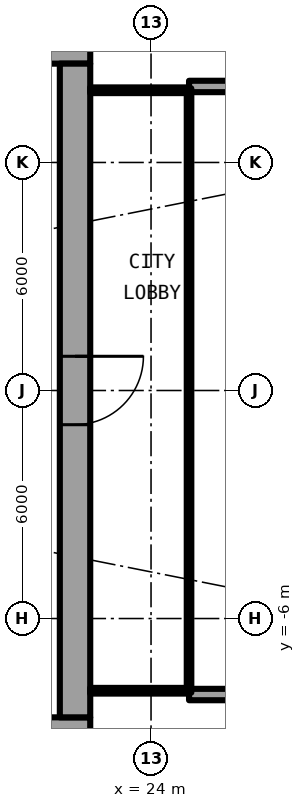
"""IFC4 building model, lengths in metres.
Left out: names, types, materials, properties, quantities, classifications, styles, units other than length and angle.
Written with IfcOpenShell. Run it as: python <this file> out.ifc"""

import sys

from ifc_helpers import new_model, si_unit, direction, frame, frame_2d, origin, place, context, subcontext, project, spatial, rectangle, extrude, element, fill, save


model = new_model("IFC4")
c1 = context("Model", 3, precision=1e-05, world=origin(), true_north=direction((0.0, 1.0)))
c2 = subcontext(c1, "Body", "Model", "MODEL_VIEW")
j1 = project(units=[si_unit("LENGTHUNIT", "METRE"), si_unit("PLANEANGLEUNIT", "RADIAN")], contexts=[c1])
p1 = place(None, origin())
s1 = spatial("IfcSite", under=j1, at=p1, CompositionType="ELEMENT")
p2 = place(p1, origin())
s2 = spatial("IfcBuilding", under=s1, at=p2, CompositionType="ELEMENT")
p3 = place(p2, frame((0.0, 0.0, 47.2)))
s3 = spatial("IfcBuildingStorey", under=s2, at=p3, CompositionType="ELEMENT", Elevation=47.2)
for number, where, z_axis, x_axis in (
    (1, (25.0, 8.0, 0.0), (0.0, 0.0, 1.0), (1.0, 0.0, 0.0)),
    (2, (25.0, -8.0, 0.0), (0.0, 0.0, 1.0), (1.0, 0.0, 0.0)),
):
    element("IfcWall", number, at=place(p3, frame(where, z_axis=z_axis, x_axis=x_axis)), inside=s3, PredefinedType="SOLIDWALL", context=c2, shape_type="SweptSolid", body=[
        extrude(rectangle(XDim=2.667, YDim=0.3, at=frame_2d((1.333, 0.0))), origin(), (0.0, 0.0, 1.0), 2.7),
    ])
p4 = place(p3, frame((22.4, 9.0, 0.0), z_axis=(0.0, 0.0, 1.0), x_axis=(-1.0, 0.0, 0.0)))
e3 = element("IfcWall", 3, at=p4, inside=s3, PredefinedType="SHEAR", context=c2, shape_type="SweptSolid", body=[
    extrude(rectangle(XDim=14.2, YDim=0.8, at=frame_2d((7.1, 0.0))), origin(), (0.0, 0.0, 1.0), 3.05),
])
p5 = place(p4, frame((1.325, 0.0, 0.0)))
e4 = element("IfcOpeningElement", 4, at=p5, cuts=e3, PredefinedType="OPENING", context=c2, shape_type="SweptSolid", body=[
    extrude(rectangle(XDim=1.2, YDim=2.3, at=frame_2d((0.6, 1.15))), frame((0.0, 0.41, 0.0), z_axis=(0.0, -1.0, 0.0), x_axis=(1.0, 0.0, 0.0)), (0.0, 0.0, 1.0), 0.82),
])
p6 = place(p3, frame((8.2, -9.0, 0.0), z_axis=(0.0, 0.0, 1.0), x_axis=(1.0, 0.0, 0.0)))
e5 = element("IfcWall", 5, at=p6, inside=s3, PredefinedType="SHEAR", context=c2, shape_type="SweptSolid", body=[
    extrude(rectangle(XDim=14.2, YDim=0.8, at=frame_2d((7.1, 0.0))), origin(), (0.0, 0.0, 1.0), 3.05),
])
p7 = place(p6, frame((11.675, 0.0, 0.0)))
e6 = element("IfcOpeningElement", 6, at=p7, cuts=e5, PredefinedType="OPENING", context=c2, shape_type="SweptSolid", body=[
    extrude(rectangle(XDim=1.2, YDim=2.3, at=frame_2d((0.6, 1.15))), frame((0.0, 0.41, 0.0), z_axis=(0.0, -1.0, 0.0), x_axis=(1.0, 0.0, 0.0)), (0.0, 0.0, 1.0), 0.82),
])
p8 = place(p3, frame((22.0, 8.6, 0.0), z_axis=(0.0, 0.0, 1.0), x_axis=(0.0, -1.0, 0.0)))
e7 = element("IfcWall", 7, at=p8, inside=s3, PredefinedType="SHEAR", context=c2, shape_type="SweptSolid", body=[
    extrude(rectangle(XDim=17.2, YDim=0.8, at=frame_2d((8.6, 0.0))), origin(), (0.0, 0.0, 1.0), 3.05),
])
p9 = place(p8, frame((7.7, 0.0, 0.0)))
e8 = element("IfcOpeningElement", 8, at=p9, cuts=e7, PredefinedType="OPENING", context=c2, shape_type="SweptSolid", body=[
    extrude(rectangle(XDim=1.8, YDim=2.3, at=frame_2d((0.9, 1.15))), frame((0.0, 0.41, 0.0), z_axis=(0.0, -1.0, 0.0), x_axis=(1.0, 0.0, 0.0)), (0.0, 0.0, 1.0), 0.82),
])
for number, where, z_axis, x_axis in (
    (9, (22.4, -7.9, 0.0), (0.0, 0.0, 1.0), (1.0, 0.0, 0.0)),
    (10, (22.4, 7.9, 0.0), (0.0, 0.0, 1.0), (1.0, 0.0, 0.0)),
):
    element("IfcWall", number, at=place(p3, frame(where, z_axis=z_axis, x_axis=x_axis)), inside=s3, PredefinedType="PARTITIONING", context=c2, shape_type="SweptSolid", body=[
        extrude(rectangle(XDim=2.54, YDim=0.15, at=frame_2d((1.27, 0.0))), origin(), (0.0, 0.0, 1.0), 2.7),
    ])
p10 = place(p3, frame((25.0, -7.95, 0.0), z_axis=(0.0, 0.0, 1.0), x_axis=(0.0, 1.0, 0.0)))
e11 = element("IfcWall", 11, at=p10, inside=s3, PredefinedType="PARTITIONING", context=c2, shape_type="SweptSolid", body=[
    extrude(rectangle(XDim=15.9, YDim=0.12, at=frame_2d((7.95, 0.0))), origin(), (0.0, 0.0, 1.0), 2.7),
])
p11 = place(p10, frame((0.95, 0.0, 0.1)))
e12 = element("IfcOpeningElement", 12, at=p11, cuts=e11, PredefinedType="OPENING", context=c2, shape_type="SweptSolid", body=[
    extrude(rectangle(XDim=14.0, YDim=2.35, at=frame_2d((7.0, 1.175))), frame((0.0, 0.07, 0.0), z_axis=(0.0, -1.0, 0.0), x_axis=(1.0, 0.0, 0.0)), (0.0, 0.0, 1.0), 0.14),
])
p12 = place(p9, origin())
e13 = element("IfcDoor", 13, at=p12, inside=s3, OperationType="SINGLE_SWING_LEFT", PredefinedType="DOOR", context=c2, shape_type="SweptSolid", body=[
    extrude(rectangle(XDim=1.8, YDim=2.3, at=frame_2d((0.9, 1.15))), frame((0.0, 0.025, 0.0), z_axis=(0.0, -1.0, 0.0), x_axis=(1.0, 0.0, 0.0)), (0.0, 0.0, 1.0), 0.05),
])
fill(e8, e13)
p13 = place(p11, origin())
e14 = element("IfcWindow", 14, at=p13, inside=s3, PartitioningType="SINGLE_PANEL", PredefinedType="WINDOW", context=c2, shape_type="SweptSolid", body=[
    extrude(rectangle(XDim=14.0, YDim=2.35, at=frame_2d((7.0, 1.175))), frame((0.0, 0.03, 0.0), z_axis=(0.0, -1.0, 0.0), x_axis=(1.0, 0.0, 0.0)), (0.0, 0.0, 1.0), 0.06),
])
fill(e12, e14)
save(model, sys.argv[1])
